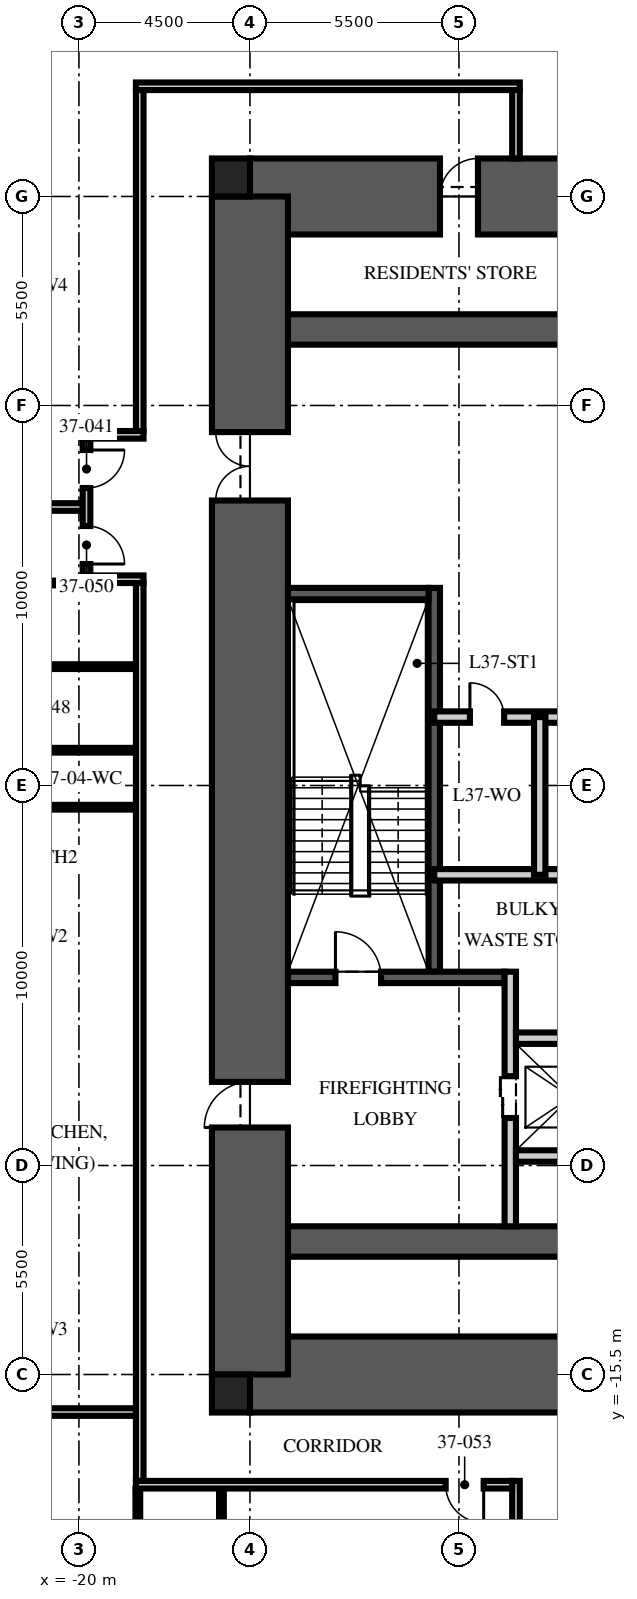
"""IFC4 building model, lengths in metres.
Left out: names, types, materials, properties, quantities, classifications, styles, units other than length and angle.
Written with IfcOpenShell. Run it as: python <this file> out.ifc"""

import sys

from ifc_helpers import new_model, si_unit, direction, frame, frame_2d, origin, origin_2d, place, context, subcontext, project, spatial, rectangle, extrude, element, fill, save


model = new_model("IFC4")
c1 = context("Model", 3, precision=1e-05, world=origin(), true_north=direction((0.0, 1.0)))
c2 = subcontext(c1, "Body", "Model", "MODEL_VIEW")
j1 = project(units=[si_unit("LENGTHUNIT", "METRE"), si_unit("PLANEANGLEUNIT", "RADIAN")], contexts=[c1])
p1 = place(None, origin())
s1 = spatial("IfcSite", under=j1, at=p1, CompositionType="ELEMENT")
p2 = place(p1, origin())
s2 = spatial("IfcBuilding", under=s1, at=p2, CompositionType="ELEMENT")
p3 = place(p2, frame((0.0, 0.0, 148.5)))
s3 = spatial("IfcBuildingStorey", under=s2, at=p3, CompositionType="ELEMENT", Elevation=148.5)
p4 = place(p3, frame((-15.5, 15.5, -0.25), z_axis=(0.0, 0.0, 1.0), x_axis=(1.0, 0.0, 0.0)))
e1 = element("IfcWall", 1, at=p4, inside=s3, PredefinedType="SHEAR", context=c2, shape_type="SweptSolid", body=[
    extrude(rectangle(XDim=31.0, YDim=2.0, at=frame_2d((15.5, 0.0))), origin(), (0.0, 0.0, 1.0), 3.75),
])
p5 = place(p4, frame((5.0, 0.0, 0.25)))
e2 = element("IfcOpeningElement", 2, at=p5, cuts=e1, PredefinedType="OPENING", context=c2, shape_type="SweptSolid", body=[
    extrude(rectangle(XDim=1.0, YDim=2.1, at=frame_2d((0.5, 1.05))), frame((0.0, 1.01, 0.0), z_axis=(0.0, -1.0, 0.0), x_axis=(1.0, 0.0, 0.0)), (0.0, 0.0, 1.0), 2.02),
])
p6 = place(p3, frame((-15.5, -15.5, -0.25), z_axis=(0.0, 0.0, 1.0), x_axis=(1.0, 0.0, 0.0)))
e3 = element("IfcWall", 3, at=p6, inside=s3, PredefinedType="SHEAR", context=c2, shape_type="SweptSolid", body=[
    extrude(rectangle(XDim=31.0, YDim=2.0, at=frame_2d((15.5, 0.0))), origin(), (0.0, 0.0, 1.0), 3.75),
])
p7 = place(p6, frame((10.4, 0.0, 0.25)))
e4 = element("IfcOpeningElement", 4, at=p7, cuts=e3, PredefinedType="OPENING", context=c2, shape_type="SweptSolid", body=[
    extrude(rectangle(XDim=1.1, YDim=2.1, at=frame_2d((0.55, 1.05))), frame((0.0, 1.01, 0.0), z_axis=(0.0, -1.0, 0.0), x_axis=(1.0, 0.0, 0.0)), (0.0, 0.0, 1.0), 2.02),
])
p8 = place(p6, frame((13.5, 0.0, 0.25)))
e5 = element("IfcOpeningElement", 5, at=p8, cuts=e3, PredefinedType="OPENING", context=c2, shape_type="SweptSolid", body=[
    extrude(rectangle(XDim=1.1, YDim=2.1, at=frame_2d((0.55, 1.05))), frame((0.0, 1.01, 0.0), z_axis=(0.0, -1.0, 0.0), x_axis=(1.0, 0.0, 0.0)), (0.0, 0.0, 1.0), 2.02),
])
p9 = place(p6, frame((16.6, 0.0, 0.25)))
e6 = element("IfcOpeningElement", 6, at=p9, cuts=e3, PredefinedType="OPENING", context=c2, shape_type="SweptSolid", body=[
    extrude(rectangle(XDim=1.1, YDim=2.1, at=frame_2d((0.55, 1.05))), frame((0.0, 1.01, 0.0), z_axis=(0.0, -1.0, 0.0), x_axis=(1.0, 0.0, 0.0)), (0.0, 0.0, 1.0), 2.02),
])
for number, where, z_axis, x_axis in (
    (7, (-15.5, 12.0, -0.25), (0.0, 0.0, 1.0), (1.0, 0.0, 0.0)),
    (8, (-15.5, -12.0, -0.25), (0.0, 0.0, 1.0), (1.0, 0.0, 0.0)),
):
    element("IfcWall", number, at=place(p3, frame(where, z_axis=z_axis, x_axis=x_axis)), inside=s3, PredefinedType="SHEAR", context=c2, shape_type="SweptSolid", body=[
        extrude(rectangle(XDim=31.0, YDim=0.8, at=frame_2d((15.5, 0.0))), origin(), (0.0, 0.0, 1.0), 3.75),
    ])
p10 = place(p3, frame((-15.5, -15.5, -0.25), z_axis=(0.0, 0.0, 1.0), x_axis=(0.0, 1.0, 0.0)))
e9 = element("IfcWall", 9, at=p10, inside=s3, PredefinedType="SHEAR", context=c2, shape_type="SweptSolid", body=[
    extrude(rectangle(XDim=31.0, YDim=2.0, at=frame_2d((15.5, 0.0))), origin(), (0.0, 0.0, 1.0), 3.75),
])
p11 = place(p10, frame((6.5, 0.0, 0.25)))
e10 = element("IfcOpeningElement", 10, at=p11, cuts=e9, PredefinedType="OPENING", context=c2, shape_type="SweptSolid", body=[
    extrude(rectangle(XDim=1.2, YDim=2.1, at=frame_2d((0.6, 1.05))), frame((0.0, 1.01, 0.0), z_axis=(0.0, -1.0, 0.0), x_axis=(1.0, 0.0, 0.0)), (0.0, 0.0, 1.0), 2.02),
])
p12 = place(p10, frame((23.0, 0.0, 0.25)))
e11 = element("IfcOpeningElement", 11, at=p12, cuts=e9, PredefinedType="OPENING", context=c2, shape_type="SweptSolid", body=[
    extrude(rectangle(XDim=1.8, YDim=2.1, at=frame_2d((0.9, 1.05))), frame((0.0, 1.01, 0.0), z_axis=(0.0, -1.0, 0.0), x_axis=(1.0, 0.0, 0.0)), (0.0, 0.0, 1.0), 2.02),
])
for number, where, z_axis, x_axis in (
    (12, (-16.0, 16.0, -0.25), (0.0, 0.0, 1.0), (1.0, 0.0, 0.0)),
    (13, (-16.0, -16.0, -0.25), (0.0, 0.0, 1.0), (1.0, 0.0, 0.0)),
):
    element("IfcColumn", number, at=place(p3, frame(where, z_axis=z_axis, x_axis=x_axis)), inside=s3, PredefinedType="COLUMN", context=c2, shape_type="SweptSolid", body=[
        extrude(rectangle(XDim=1.0, YDim=1.0, at=origin_2d()), origin(), (0.0, 0.0, 1.0), 3.75),
    ])
p13 = place(p3, frame((-10.65, -4.9, 0.0), z_axis=(0.0, 0.0, 1.0), x_axis=(0.0, 1.0, 0.0)))
e14 = element("IfcWall", 14, at=p13, inside=s3, PredefinedType="SOLIDWALL", context=c2, shape_type="SweptSolid", body=[
    extrude(rectangle(XDim=10.1, YDim=0.3, at=frame_2d((5.05, 0.0))), origin(), (0.0, 0.0, 1.0), 3.5),
])
p14 = place(p3, frame((-14.5, -5.05, 0.0), z_axis=(0.0, 0.0, 1.0), x_axis=(1.0, 0.0, 0.0)))
e15 = element("IfcWall", 15, at=p14, inside=s3, PredefinedType="SOLIDWALL", context=c2, shape_type="SweptSolid", body=[
    extrude(rectangle(XDim=5.7, YDim=0.3, at=frame_2d((2.85, 0.0))), origin(), (0.0, 0.0, 1.0), 3.5),
])
p15 = place(p14, frame((1.25, 0.0, 0.0)))
e16 = element("IfcOpeningElement", 16, at=p15, cuts=e15, PredefinedType="OPENING", context=c2, shape_type="SweptSolid", body=[
    extrude(rectangle(XDim=1.2, YDim=2.1, at=frame_2d((0.6, 1.05))), frame((0.0, 0.16, 0.0), z_axis=(0.0, -1.0, 0.0), x_axis=(1.0, 0.0, 0.0)), (0.0, 0.0, 1.0), 0.32),
])
p16 = place(p3, frame((-14.5, 5.05, 0.0), z_axis=(0.0, 0.0, 1.0), x_axis=(1.0, 0.0, 0.0)))
e17 = element("IfcWall", 17, at=p16, inside=s3, PredefinedType="SOLIDWALL", context=c2, shape_type="SweptSolid", body=[
    extrude(rectangle(XDim=3.7, YDim=0.3, at=frame_2d((1.85, 0.0))), origin(), (0.0, 0.0, 1.0), 3.5),
])
p17 = place(p3, frame((-8.65, -11.6, 0.0), z_axis=(0.0, 0.0, 1.0), x_axis=(0.0, 1.0, 0.0)))
e18 = element("IfcWall", 18, at=p17, inside=s3, PredefinedType="PARTITIONING", context=c2, shape_type="SweptSolid", body=[
    extrude(rectangle(XDim=6.7, YDim=0.3, at=frame_2d((3.35, 0.0))), origin(), (0.0, 0.0, 1.0), 3.5),
])
p18 = place(p17, frame((2.85, 0.0, 0.0)))
e19 = element("IfcOpeningElement", 19, at=p18, cuts=e18, PredefinedType="OPENING", context=c2, shape_type="SweptSolid", body=[
    extrude(rectangle(XDim=1.1, YDim=2.1, at=frame_2d((0.55, 1.05))), frame((0.0, 0.16, 0.0), z_axis=(0.0, -1.0, 0.0), x_axis=(1.0, 0.0, 0.0)), (0.0, 0.0, 1.0), 0.32),
])
p19 = place(p3, frame((-8.5, -6.65, 0.0), z_axis=(0.0, 0.0, 1.0), x_axis=(1.0, 0.0, 0.0)))
e20 = element("IfcWall", 20, at=p19, inside=s3, PredefinedType="PARTITIONING", context=c2, shape_type="SweptSolid", body=[
    extrude(rectangle(XDim=17.0, YDim=0.3, at=frame_2d((8.5, 0.0))), origin(), (0.0, 0.0, 1.0), 3.5),
])
p20 = place(p19, frame((7.8, 0.0, 0.0)))
e21 = element("IfcOpeningElement", 21, at=p20, cuts=e20, PredefinedType="OPENING", context=c2, shape_type="SweptSolid", body=[
    extrude(rectangle(XDim=1.3, YDim=2.4, at=frame_2d((0.65, 1.2))), frame((0.0, 0.16, 0.0), z_axis=(0.0, -1.0, 0.0), x_axis=(1.0, 0.0, 0.0)), (0.0, 0.0, 1.0), 0.32),
])
p21 = place(p19, frame((5.65, 0.0, 0.0)))
e22 = element("IfcOpeningElement", 22, at=p21, cuts=e20, PredefinedType="OPENING", context=c2, shape_type="SweptSolid", body=[
    extrude(rectangle(XDim=0.9, YDim=2.1, at=frame_2d((0.45, 1.05))), frame((0.0, 0.16, 0.0), z_axis=(0.0, -1.0, 0.0), x_axis=(1.0, 0.0, 0.0)), (0.0, 0.0, 1.0), 0.32),
])
p22 = place(p19, frame((10.4, 0.0, 0.0)))
e23 = element("IfcOpeningElement", 23, at=p22, cuts=e20, PredefinedType="OPENING", context=c2, shape_type="SweptSolid", body=[
    extrude(rectangle(XDim=0.9, YDim=2.1, at=frame_2d((0.45, 1.05))), frame((0.0, 0.16, 0.0), z_axis=(0.0, -1.0, 0.0), x_axis=(1.0, 0.0, 0.0)), (0.0, 0.0, 1.0), 0.32),
])
p23 = place(p3, frame((-8.5, -9.75, 0.0), z_axis=(0.0, 0.0, 1.0), x_axis=(1.0, 0.0, 0.0)))
e24 = element("IfcWall", 24, at=p23, inside=s3, PredefinedType="PARTITIONING", context=c2, shape_type="SweptSolid", body=[
    extrude(rectangle(XDim=2.9, YDim=0.3, at=frame_2d((1.45, 0.0))), origin(), (0.0, 0.0, 1.0), 3.5),
])
p24 = place(p3, frame((-10.65, 1.8, 0.0), z_axis=(0.0, 0.0, 1.0), x_axis=(1.0, 0.0, 0.0)))
e25 = element("IfcWall", 25, at=p24, inside=s3, PredefinedType="PARTITIONING", context=c2, shape_type="SweptSolid", body=[
    extrude(rectangle(XDim=21.3, YDim=0.3, at=frame_2d((10.65, 0.0))), origin(), (0.0, 0.0, 1.0), 3.5),
])
p25 = place(p24, frame((10.05, 0.0, 0.0)))
e26 = element("IfcOpeningElement", 26, at=p25, cuts=e25, PredefinedType="OPENING", context=c2, shape_type="SweptSolid", body=[
    extrude(rectangle(XDim=1.2, YDim=2.1, at=frame_2d((0.6, 1.05))), frame((0.0, 0.16, 0.0), z_axis=(0.0, -1.0, 0.0), x_axis=(1.0, 0.0, 0.0)), (0.0, 0.0, 1.0), 0.32),
])
p26 = place(p24, frame((0.938, 0.0, 0.0)))
e27 = element("IfcOpeningElement", 27, at=p26, cuts=e25, PredefinedType="OPENING", context=c2, shape_type="SweptSolid", body=[
    extrude(rectangle(XDim=0.9, YDim=2.1, at=frame_2d((0.45, 1.05))), frame((0.0, 0.16, 0.0), z_axis=(0.0, -1.0, 0.0), x_axis=(1.0, 0.0, 0.0)), (0.0, 0.0, 1.0), 0.32),
])
p27 = place(p3, frame((-10.65, -2.35, 0.0), z_axis=(0.0, 0.0, 1.0), x_axis=(1.0, 0.0, 0.0)))
e28 = element("IfcWall", 28, at=p27, inside=s3, PredefinedType="PARTITIONING", context=c2, shape_type="SweptSolid", body=[
    extrude(rectangle(XDim=5.55, YDim=0.3, at=frame_2d((2.775, 0.0))), origin(), (0.0, 0.0, 1.0), 3.5),
])
p28 = place(p3, frame((-7.875, -2.35, 0.0), z_axis=(0.0, 0.0, 1.0), x_axis=(0.0, 1.0, 0.0)))
e29 = element("IfcWall", 29, at=p28, inside=s3, PredefinedType="PARTITIONING", context=c2, shape_type="SweptSolid", body=[
    extrude(rectangle(XDim=4.15, YDim=0.3, at=frame_2d((2.075, 0.0))), origin(), (0.0, 0.0, 1.0), 3.5),
])
p29 = place(p3, frame((-18.5, 18.4, 0.0), z_axis=(0.0, 0.0, 1.0), x_axis=(1.0, 0.0, 0.0)))
e30 = element("IfcWall", 30, at=p29, inside=s3, PredefinedType="PARTITIONING", context=c2, shape_type="SweptSolid", body=[
    extrude(rectangle(XDim=10.1, YDim=0.2, at=frame_2d((5.05, 0.0))), origin(), (0.0, 0.0, 1.0), 2.3),
])
p30 = place(p3, frame((-8.5, 18.3, 0.0), z_axis=(0.0, 0.0, 1.0), x_axis=(0.0, -1.0, 0.0)))
e31 = element("IfcWall", 31, at=p30, inside=s3, PredefinedType="PARTITIONING", context=c2, shape_type="SweptSolid", body=[
    extrude(rectangle(XDim=1.8, YDim=0.2, at=frame_2d((0.9, 0.0))), origin(), (0.0, 0.0, 1.0), 3.5),
])
p31 = place(p3, frame((-19.9, 7.328, 0.0), z_axis=(0.0, 0.0, 1.0), x_axis=(-1.0, 0.0, 0.0)))
e32 = element("IfcWall", 32, at=p31, inside=s3, PredefinedType="PARTITIONING", context=c2, shape_type="SweptSolid", body=[
    extrude(rectangle(XDim=8.75, YDim=0.2, at=frame_2d((4.375, 0.0))), origin(), (0.0, 0.0, 1.0), 2.81),
])
p32 = place(p3, frame((-18.5, -16.488, 0.0), z_axis=(0.0, 0.0, 1.0), x_axis=(-1.0, 0.0, 0.0)))
e33 = element("IfcWall", 33, at=p32, inside=s3, PredefinedType="PARTITIONING", context=c2, shape_type="SweptSolid", body=[
    extrude(rectangle(XDim=10.15, YDim=0.2, at=frame_2d((5.075, 0.0))), origin(), (0.0, 0.0, 1.0), 2.81),
])
p33 = place(p3, frame((-19.97, 5.328, 0.0), z_axis=(0.0, 0.0, 1.0), x_axis=(-1.0, 0.0, 0.0)))
e34 = element("IfcWall", 34, at=p33, inside=s3, PredefinedType="PARTITIONING", context=c2, shape_type="SweptSolid", body=[
    extrude(rectangle(XDim=2.56, YDim=0.125, at=frame_2d((1.28, 0.0))), origin(), (0.0, 0.0, 1.0), 3.5),
])
for number, where, z_axis, x_axis in (
    (35, (-18.5, 3.128, 0.0), (0.0, 0.0, 1.0), (-1.0, 0.0, 0.0)),
    (36, (-18.5, 0.928, 0.0), (0.0, 0.0, 1.0), (-1.0, 0.0, 0.0)),
    (37, (-18.5, -0.572, 0.0), (0.0, 0.0, 1.0), (-1.0, 0.0, 0.0)),
):
    element("IfcWall", number, at=place(p3, frame(where, z_axis=z_axis, x_axis=x_axis)), inside=s3, PredefinedType="PARTITIONING", context=c2, shape_type="SweptSolid", body=[
        extrude(rectangle(XDim=4.03, YDim=0.125, at=frame_2d((2.015, 0.0))), origin(), (0.0, 0.0, 1.0), 3.5),
    ])
p34 = place(p3, frame((-18.45, -18.5, 0.0), z_axis=(0.0, 0.0, 1.0), x_axis=(0.0, -1.0, 0.0)))
e38 = element("IfcWall", 38, at=p34, inside=s3, PredefinedType="PARTITIONING", context=c2, shape_type="SweptSolid", body=[
    extrude(rectangle(XDim=4.03, YDim=0.125, at=frame_2d((2.015, 0.0))), origin(), (0.0, 0.0, 1.0), 2.3),
])
p35 = place(p3, frame((-16.25, -18.5, 0.0), z_axis=(0.0, 0.0, 1.0), x_axis=(0.0, -1.0, 0.0)))
e39 = element("IfcWall", 39, at=p35, inside=s3, PredefinedType="PARTITIONING", context=c2, shape_type="SweptSolid", body=[
    extrude(rectangle(XDim=4.03, YDim=0.125, at=frame_2d((2.015, 0.0))), origin(), (0.0, 0.0, 1.0), 3.5),
])
p36 = place(p3, frame((-18.4, 18.3, 0.0), z_axis=(0.0, 0.0, 1.0), x_axis=(0.0, -1.0, 0.0)))
e40 = element("IfcWall", 40, at=p36, inside=s3, PredefinedType="PARTITIONING", context=c2, shape_type="SweptSolid", body=[
    extrude(rectangle(XDim=8.972, YDim=0.2, at=frame_2d((4.486, 0.0))), origin(), (0.0, 0.0, 1.0), 2.3),
])
p37 = place(p3, frame((-18.3, 9.228, 0.0), z_axis=(0.0, 0.0, 1.0), x_axis=(-1.0, 0.0, 0.0)))
e41 = element("IfcWall", 41, at=p37, inside=s3, PredefinedType="PARTITIONING", context=c2, shape_type="SweptSolid", body=[
    extrude(rectangle(XDim=1.6, YDim=0.2, at=frame_2d((0.8, 0.0))), origin(), (0.0, 0.0, 1.0), 2.7),
])
p38 = place(p3, frame((-18.3, 5.428, 0.0), z_axis=(0.0, 0.0, 1.0), x_axis=(-1.0, 0.0, 0.0)))
e42 = element("IfcWall", 42, at=p38, inside=s3, PredefinedType="PARTITIONING", context=c2, shape_type="SweptSolid", body=[
    extrude(rectangle(XDim=1.6, YDim=0.2, at=frame_2d((0.8, 0.0))), origin(), (0.0, 0.0, 1.0), 3.5),
])
p39 = place(p3, frame((-19.8, 9.128, 0.0), z_axis=(0.0, 0.0, 1.0), x_axis=(0.0, -1.0, 0.0)))
e43 = element("IfcWall", 43, at=p39, inside=s3, PredefinedType="PARTITIONING", context=c2, shape_type="SweptSolid", body=[
    extrude(rectangle(XDim=3.6, YDim=0.2, at=frame_2d((1.8, 0.0))), origin(), (0.0, 0.0, 1.0), 2.7),
])
p40 = place(p39, frame((0.3, 0.0, 0.0)))
e44 = element("IfcOpeningElement", 44, at=p40, cuts=e43, PredefinedType="OPENING", context=c2, shape_type="SweptSolid", body=[
    extrude(rectangle(XDim=1.0, YDim=2.2, at=frame_2d((0.5, 1.1))), frame((0.0, 0.11, 0.0), z_axis=(0.0, -1.0, 0.0), x_axis=(1.0, 0.0, 0.0)), (0.0, 0.0, 1.0), 0.22),
])
p41 = place(p39, frame((2.3, 0.0, 0.0)))
e45 = element("IfcOpeningElement", 45, at=p41, cuts=e43, PredefinedType="OPENING", context=c2, shape_type="SweptSolid", body=[
    extrude(rectangle(XDim=1.0, YDim=2.2, at=frame_2d((0.5, 1.1))), frame((0.0, 0.11, 0.0), z_axis=(0.0, -1.0, 0.0), x_axis=(1.0, 0.0, 0.0)), (0.0, 0.0, 1.0), 0.22),
])
p42 = place(p3, frame((-18.4, 5.328, 0.0), z_axis=(0.0, 0.0, 1.0), x_axis=(0.0, -1.0, 0.0)))
e46 = element("IfcWall", 46, at=p42, inside=s3, PredefinedType="PARTITIONING", context=c2, shape_type="SweptSolid", body=[
    extrude(rectangle(XDim=23.628, YDim=0.2, at=frame_2d((11.814, 0.0))), origin(), (0.0, 0.0, 1.0), 2.3),
])
p43 = place(p3, frame((-8.5, -18.3, 0.0), z_axis=(0.0, 0.0, 1.0), x_axis=(0.0, -1.0, 0.0)))
e47 = element("IfcWall", 47, at=p43, inside=s3, PredefinedType="PARTITIONING", context=c2, shape_type="SweptSolid", body=[
    extrude(rectangle(XDim=3.0, YDim=0.2, at=frame_2d((1.5, 0.0))), origin(), (0.0, 0.0, 1.0), 3.5),
])
p44 = place(p3, frame((-8.6, -18.4, 0.0), z_axis=(0.0, 0.0, 1.0), x_axis=(-1.0, 0.0, 0.0)))
e48 = element("IfcWall", 48, at=p44, inside=s3, PredefinedType="PARTITIONING", context=c2, shape_type="SweptSolid", body=[
    extrude(rectangle(XDim=9.9, YDim=0.2, at=frame_2d((4.95, 0.0))), origin(), (0.0, 0.0, 1.0), 2.3),
])
p45 = place(p44, frame((0.75, 0.0, 0.0)))
e49 = element("IfcOpeningElement", 49, at=p45, cuts=e48, PredefinedType="OPENING", context=c2, shape_type="SweptSolid", body=[
    extrude(rectangle(XDim=1.0, YDim=2.2, at=frame_2d((0.5, 1.1))), frame((0.0, 0.11, 0.0), z_axis=(0.0, -1.0, 0.0), x_axis=(1.0, 0.0, 0.0)), (0.0, 0.0, 1.0), 0.22),
])
p46 = place(p15, origin())
e50 = element("IfcDoor", 50, at=p46, inside=s3, OperationType="SINGLE_SWING_LEFT", PredefinedType="DOOR", context=c2, shape_type="SweptSolid", body=[
    extrude(rectangle(XDim=1.2, YDim=2.1, at=frame_2d((0.6, 1.05))), frame((0.0, 0.025, 0.0), z_axis=(0.0, -1.0, 0.0), x_axis=(1.0, 0.0, 0.0)), (0.0, 0.0, 1.0), 0.05),
])
fill(e16, e50)
p47 = place(p11, origin())
e51 = element("IfcDoor", 51, at=p47, inside=s3, OperationType="SINGLE_SWING_LEFT", PredefinedType="DOOR", context=c2, shape_type="SweptSolid", body=[
    extrude(rectangle(XDim=1.2, YDim=2.1, at=frame_2d((0.6, 1.05))), frame((0.0, 0.025, 0.0), z_axis=(0.0, -1.0, 0.0), x_axis=(1.0, 0.0, 0.0)), (0.0, 0.0, 1.0), 0.05),
])
fill(e10, e51)
p48 = place(p12, origin())
e52 = element("IfcDoor", 52, at=p48, inside=s3, OperationType="DOUBLE_DOOR_SINGLE_SWING", PredefinedType="DOOR", context=c2, shape_type="SweptSolid", body=[
    extrude(rectangle(XDim=1.8, YDim=2.1, at=frame_2d((0.9, 1.05))), frame((0.0, 0.025, 0.0), z_axis=(0.0, -1.0, 0.0), x_axis=(1.0, 0.0, 0.0)), (0.0, 0.0, 1.0), 0.05),
])
fill(e11, e52)
p49 = place(p18, origin())
e53 = element("IfcDoor", 53, at=p49, inside=s3, OperationType="DOUBLE_DOOR_SLIDING", PredefinedType="DOOR", context=c2, shape_type="SweptSolid", body=[
    extrude(rectangle(XDim=1.1, YDim=2.1, at=frame_2d((0.55, 1.05))), frame((0.0, 0.025, 0.0), z_axis=(0.0, -1.0, 0.0), x_axis=(1.0, 0.0, 0.0)), (0.0, 0.0, 1.0), 0.05),
])
fill(e19, e53)
p50 = place(p26, origin())
e54 = element("IfcDoor", 54, at=p50, inside=s3, OperationType="SINGLE_SWING_LEFT", PredefinedType="DOOR", context=c2, shape_type="SweptSolid", body=[
    extrude(rectangle(XDim=0.9, YDim=2.1, at=frame_2d((0.45, 1.05))), frame((0.0, 0.025, 0.0), z_axis=(0.0, -1.0, 0.0), x_axis=(1.0, 0.0, 0.0)), (0.0, 0.0, 1.0), 0.05),
])
fill(e27, e54)
p51 = place(p5, origin())
e55 = element("IfcDoor", 55, at=p51, inside=s3, OperationType="SINGLE_SWING_RIGHT", PredefinedType="DOOR", context=c2, shape_type="SweptSolid", body=[
    extrude(rectangle(XDim=1.0, YDim=2.1, at=frame_2d((0.5, 1.05))), frame((0.0, 0.025, 0.0), z_axis=(0.0, -1.0, 0.0), x_axis=(1.0, 0.0, 0.0)), (0.0, 0.0, 1.0), 0.05),
])
fill(e2, e55)
p52 = place(p40, origin())
e56 = element("IfcDoor", 56, at=p52, inside=s3, OperationType="SINGLE_SWING_LEFT", PredefinedType="DOOR", context=c2, shape_type="SweptSolid", body=[
    extrude(rectangle(XDim=1.0, YDim=2.2, at=frame_2d((0.5, 1.1))), frame((0.0, 0.025, 0.0), z_axis=(0.0, -1.0, 0.0), x_axis=(1.0, 0.0, 0.0)), (0.0, 0.0, 1.0), 0.05),
])
fill(e44, e56)
p53 = place(p41, origin())
e57 = element("IfcDoor", 57, at=p53, inside=s3, OperationType="SINGLE_SWING_RIGHT", PredefinedType="DOOR", context=c2, shape_type="SweptSolid", body=[
    extrude(rectangle(XDim=1.0, YDim=2.2, at=frame_2d((0.5, 1.1))), frame((0.0, 0.025, 0.0), z_axis=(0.0, -1.0, 0.0), x_axis=(1.0, 0.0, 0.0)), (0.0, 0.0, 1.0), 0.05),
])
fill(e45, e57)
p54 = place(p45, origin())
e58 = element("IfcDoor", 58, at=p54, inside=s3, OperationType="SINGLE_SWING_LEFT", PredefinedType="DOOR", context=c2, shape_type="SweptSolid", body=[
    extrude(rectangle(XDim=1.0, YDim=2.2, at=frame_2d((0.5, 1.1))), frame((0.0, 0.025, 0.0), z_axis=(0.0, -1.0, 0.0), x_axis=(1.0, 0.0, 0.0)), (0.0, 0.0, 1.0), 0.05),
])
fill(e49, e58)
save(model, sys.argv[1])
